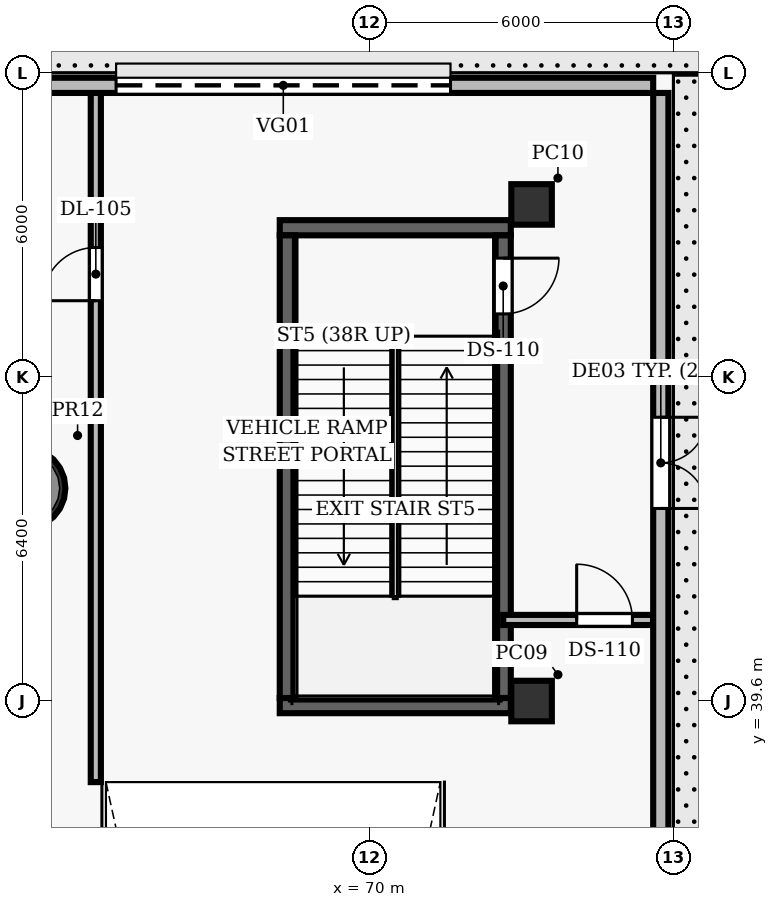
"""IFC4 building model, lengths in metres.
Left out: names, types, materials, properties, quantities, classifications, styles, units other than length and angle.
Written with IfcOpenShell. Run it as: python <this file> out.ifc"""

import sys

from ifc_helpers import new_model, si_unit, direction, frame, frame_2d, origin, origin_2d, place, context, subcontext, project, spatial, rectangle, hollow_circle, extrude, element, fill, save


model = new_model("IFC4")
c1 = context("Model", 3, precision=1e-05, world=origin(), true_north=direction((0.0, 1.0)))
c2 = subcontext(c1, "Body", "Model", "MODEL_VIEW")
j1 = project(units=[si_unit("LENGTHUNIT", "METRE"), si_unit("PLANEANGLEUNIT", "RADIAN")], contexts=[c1])
p1 = place(None, origin())
s1 = spatial("IfcSite", under=j1, at=p1, CompositionType="ELEMENT")
p2 = place(p1, origin())
s2 = spatial("IfcBuilding", under=s1, at=p2, CompositionType="ELEMENT")
p3 = place(p2, origin())
s3 = spatial("IfcBuildingStorey", under=s2, at=p3, CompositionType="ELEMENT", Elevation=0.0)
for number, where, z_axis, x_axis in (
    (1, (73.2, 39.6, 0.0), (0.0, 0.0, 1.0), (1.0, 0.0, 0.0)),
    (2, (73.2, 49.4, 0.0), (0.0, 0.0, 1.0), (1.0, 0.0, 0.0)),
):
    element("IfcColumn", number, at=place(p3, frame(where, z_axis=z_axis, x_axis=x_axis)), inside=s3, PredefinedType="COLUMN", context=c2, shape_type="SweptSolid", body=[
        extrude(rectangle(XDim=0.8, YDim=0.8, at=origin_2d()), origin(), (0.0, 0.0, 1.0), 6.6),
    ])
p4 = place(p3, frame((63.2, 43.8, 0.0), z_axis=(0.0, 0.0, 1.0), x_axis=(1.0, 0.0, 0.0)))
e3 = element("IfcColumn", 3, at=p4, inside=s3, PredefinedType="COLUMN", context=c2, shape_type="SweptSolid", body=[
    extrude(hollow_circle(Radius=0.8, WallThickness=0.06, at=origin_2d()), origin(), (0.0, 0.0, 1.0), 6.6),
])
for number, where, z_axis, x_axis in (
    (4, (68.23, 39.51, 0.0), (0.0, 0.0, 1.0), (1.0, 0.0, 0.0)),
    (5, (68.23, 48.94, 0.0), (0.0, 0.0, 1.0), (1.0, 0.0, 0.0)),
):
    element("IfcWall", number, at=place(p3, frame(where, z_axis=z_axis, x_axis=x_axis)), inside=s3, PredefinedType="SHEAR", context=c2, shape_type="SweptSolid", body=[
        extrude(rectangle(XDim=4.56, YDim=0.3, at=frame_2d((2.28, 0.0))), origin(), (0.0, 0.0, 1.0), 6.6),
    ])
p5 = place(p3, frame((68.38, 39.66, 0.0), z_axis=(0.0, 0.0, 1.0), x_axis=(0.0, 1.0, 0.0)))
e6 = element("IfcWall", 6, at=p5, inside=s3, PredefinedType="SHEAR", context=c2, shape_type="SweptSolid", body=[
    extrude(rectangle(XDim=9.13, YDim=0.3, at=frame_2d((4.565, 0.0))), origin(), (0.0, 0.0, 1.0), 6.6),
])
p6 = place(p3, frame((72.64, 48.79, 0.0), z_axis=(0.0, 0.0, 1.0), x_axis=(0.0, -1.0, 0.0)))
e7 = element("IfcWall", 7, at=p6, inside=s3, PredefinedType="SHEAR", context=c2, shape_type="SweptSolid", body=[
    extrude(rectangle(XDim=9.13, YDim=0.3, at=frame_2d((4.565, 0.0))), origin(), (0.0, 0.0, 1.0), 6.6),
])
p7 = place(p6, frame((0.45, 0.0, 0.0)))
e8 = element("IfcOpeningElement", 8, at=p7, cuts=e7, PredefinedType="OPENING", context=c2, shape_type="SweptSolid", body=[
    extrude(rectangle(XDim=1.1, YDim=2.15, at=frame_2d((0.55, 1.075))), frame((0.0, 0.16, 0.0), z_axis=(0.0, -1.0, 0.0), x_axis=(1.0, 0.0, 0.0)), (0.0, 0.0, 1.0), 0.32),
])
p8 = place(p3, frame((72.64, 41.2, 0.0), z_axis=(0.0, 0.0, 1.0), x_axis=(1.0, 0.0, 0.0)))
e9 = element("IfcWall", 9, at=p8, inside=s3, PredefinedType="PARTITIONING", context=c2, shape_type="SweptSolid", body=[
    extrude(rectangle(XDim=2.96, YDim=0.2, at=frame_2d((1.48, 0.0))), origin(), (0.0, 0.0, 1.0), 5.31),
])
p9 = place(p8, frame((1.45, 0.0, 0.0)))
e10 = element("IfcOpeningElement", 10, at=p9, cuts=e9, PredefinedType="OPENING", context=c2, shape_type="SweptSolid", body=[
    extrude(rectangle(XDim=1.1, YDim=2.15, at=frame_2d((0.55, 1.075))), frame((0.0, 0.11, 0.0), z_axis=(0.0, -1.0, 0.0), x_axis=(1.0, 0.0, 0.0)), (0.0, 0.0, 1.0), 0.22),
])
p10 = place(p3, frame((64.6, 38.0, 0.0), z_axis=(0.0, 0.0, 1.0), x_axis=(0.0, 1.0, 0.0)))
e11 = element("IfcWall", 11, at=p10, inside=s3, PredefinedType="PARTITIONING", context=c2, shape_type="SweptSolid", body=[
    extrude(rectangle(XDim=13.86, YDim=0.2, at=frame_2d((6.93, 0.0))), origin(), (0.0, 0.0, 1.0), 5.31),
])
p11 = place(p10, frame((9.5, 0.0, 0.0)))
e12 = element("IfcOpeningElement", 12, at=p11, cuts=e11, PredefinedType="OPENING", context=c2, shape_type="SweptSolid", body=[
    extrude(rectangle(XDim=1.05, YDim=2.15, at=frame_2d((0.525, 1.075))), frame((0.0, 0.11, 0.0), z_axis=(0.0, -1.0, 0.0), x_axis=(1.0, 0.0, 0.0)), (0.0, 0.0, 1.0), 0.22),
])
p12 = place(p3, frame((0.4, 51.75, 0.0), z_axis=(0.0, 0.0, 1.0), x_axis=(1.0, 0.0, 0.0)))
e13 = element("IfcWall", 13, at=p12, inside=s3, PredefinedType="SOLIDWALL", context=c2, shape_type="SweptSolid", body=[
    extrude(rectangle(XDim=75.2, YDim=0.3, at=frame_2d((37.6, 0.0))), origin(), (0.0, 0.0, 1.0), 5.76),
])
p13 = place(p12, frame((22.0, 0.0, 1.0)))
e14 = element("IfcOpeningElement", 14, at=p13, cuts=e13, PredefinedType="OPENING", context=c2, shape_type="SweptSolid", body=[
    extrude(rectangle(XDim=2.4, YDim=2.0, at=frame_2d((1.2, 1.0))), frame((0.0, 0.16, 0.0), z_axis=(0.0, -1.0, 0.0), x_axis=(1.0, 0.0, 0.0)), (0.0, 0.0, 1.0), 0.32),
])
p14 = place(p12, frame((42.0, 0.0, 1.0)))
e15 = element("IfcOpeningElement", 15, at=p14, cuts=e13, PredefinedType="OPENING", context=c2, shape_type="SweptSolid", body=[
    extrude(rectangle(XDim=2.4, YDim=2.0, at=frame_2d((1.2, 1.0))), frame((0.0, 0.16, 0.0), z_axis=(0.0, -1.0, 0.0), x_axis=(1.0, 0.0, 0.0)), (0.0, 0.0, 1.0), 0.32),
])
p15 = place(p12, frame((11.6, 0.0, 0.0)))
e16 = element("IfcOpeningElement", 16, at=p15, cuts=e13, PredefinedType="OPENING", context=c2, shape_type="SweptSolid", body=[
    extrude(rectangle(XDim=1.8, YDim=2.3, at=frame_2d((0.9, 1.15))), frame((0.0, 0.16, 0.0), z_axis=(0.0, -1.0, 0.0), x_axis=(1.0, 0.0, 0.0)), (0.0, 0.0, 1.0), 0.32),
])
p16 = place(p12, frame((16.6, 0.0, 0.0)))
e17 = element("IfcOpeningElement", 17, at=p16, cuts=e13, PredefinedType="OPENING", context=c2, shape_type="SweptSolid", body=[
    extrude(rectangle(XDim=1.8, YDim=2.3, at=frame_2d((0.9, 1.15))), frame((0.0, 0.16, 0.0), z_axis=(0.0, -1.0, 0.0), x_axis=(1.0, 0.0, 0.0)), (0.0, 0.0, 1.0), 0.32),
])
p17 = place(p12, frame((30.7, 0.0, 0.0)))
e18 = element("IfcOpeningElement", 18, at=p17, cuts=e13, PredefinedType="OPENING", context=c2, shape_type="SweptSolid", body=[
    extrude(rectangle(XDim=1.8, YDim=2.3, at=frame_2d((0.9, 1.15))), frame((0.0, 0.16, 0.0), z_axis=(0.0, -1.0, 0.0), x_axis=(1.0, 0.0, 0.0)), (0.0, 0.0, 1.0), 0.32),
])
p18 = place(p12, frame((34.8, 0.0, 0.0)))
e19 = element("IfcOpeningElement", 19, at=p18, cuts=e13, PredefinedType="OPENING", context=c2, shape_type="SweptSolid", body=[
    extrude(rectangle(XDim=1.8, YDim=2.3, at=frame_2d((0.9, 1.15))), frame((0.0, 0.16, 0.0), z_axis=(0.0, -1.0, 0.0), x_axis=(1.0, 0.0, 0.0)), (0.0, 0.0, 1.0), 0.32),
])
p19 = place(p12, frame((52.2, 0.0, 0.0)))
e20 = element("IfcOpeningElement", 20, at=p19, cuts=e13, PredefinedType="OPENING", context=c2, shape_type="SweptSolid", body=[
    extrude(rectangle(XDim=1.8, YDim=2.3, at=frame_2d((0.9, 1.15))), frame((0.0, 0.16, 0.0), z_axis=(0.0, -1.0, 0.0), x_axis=(1.0, 0.0, 0.0)), (0.0, 0.0, 1.0), 0.32),
])
p20 = place(p12, frame((64.6, 0.0, 0.0)))
e21 = element("IfcOpeningElement", 21, at=p20, cuts=e13, PredefinedType="OPENING", context=c2, shape_type="SweptSolid", body=[
    extrude(rectangle(XDim=6.6, YDim=3.2, at=frame_2d((3.3, 1.6))), frame((0.0, 0.16, 0.0), z_axis=(0.0, -1.0, 0.0), x_axis=(1.0, 0.0, 0.0)), (0.0, 0.0, 1.0), 0.32),
])
p21 = place(p3, frame((75.75, 51.6, 0.0), z_axis=(0.0, 0.0, 1.0), x_axis=(0.0, -1.0, 0.0)))
e22 = element("IfcWall", 22, at=p21, inside=s3, PredefinedType="SOLIDWALL", context=c2, shape_type="SweptSolid", body=[
    extrude(rectangle(XDim=51.2, YDim=0.3, at=frame_2d((25.6, 0.0))), origin(), (0.0, 0.0, 1.0), 5.76),
])
p22 = place(p21, frame((46.2, 0.0, 0.0)))
e23 = element("IfcOpeningElement", 23, at=p22, cuts=e22, PredefinedType="OPENING", context=c2, shape_type="SweptSolid", body=[
    extrude(rectangle(XDim=1.8, YDim=2.3, at=frame_2d((0.9, 1.15))), frame((0.0, 0.16, 0.0), z_axis=(0.0, -1.0, 0.0), x_axis=(1.0, 0.0, 0.0)), (0.0, 0.0, 1.0), 0.32),
])
p23 = place(p21, frame((6.4, 0.0, 0.0)))
e24 = element("IfcOpeningElement", 24, at=p23, cuts=e22, PredefinedType="OPENING", context=c2, shape_type="SweptSolid", body=[
    extrude(rectangle(XDim=1.8, YDim=2.3, at=frame_2d((0.9, 1.15))), frame((0.0, 0.16, 0.0), z_axis=(0.0, -1.0, 0.0), x_axis=(1.0, 0.0, 0.0)), (0.0, 0.0, 1.0), 0.32),
])
p24 = place(p7, origin())
e25 = element("IfcDoor", 25, at=p24, inside=s3, OperationType="SINGLE_SWING_LEFT", PredefinedType="DOOR", context=c2, shape_type="SweptSolid", body=[
    extrude(rectangle(XDim=1.1, YDim=2.15, at=frame_2d((0.55, 1.075))), frame((0.0, 0.025, 0.0), z_axis=(0.0, -1.0, 0.0), x_axis=(1.0, 0.0, 0.0)), (0.0, 0.0, 1.0), 0.05),
])
fill(e8, e25)
p25 = place(p9, origin())
e26 = element("IfcDoor", 26, at=p25, inside=s3, OperationType="SINGLE_SWING_LEFT", PredefinedType="DOOR", context=c2, shape_type="SweptSolid", body=[
    extrude(rectangle(XDim=1.1, YDim=2.15, at=frame_2d((0.55, 1.075))), frame((0.0, 0.025, 0.0), z_axis=(0.0, -1.0, 0.0), x_axis=(1.0, 0.0, 0.0)), (0.0, 0.0, 1.0), 0.05),
])
fill(e10, e26)
p26 = place(p11, origin())
e27 = element("IfcDoor", 27, at=p26, inside=s3, OperationType="SINGLE_SWING_LEFT", PredefinedType="DOOR", context=c2, shape_type="SweptSolid", body=[
    extrude(rectangle(XDim=1.05, YDim=2.15, at=frame_2d((0.525, 1.075))), frame((0.0, 0.025, 0.0), z_axis=(0.0, -1.0, 0.0), x_axis=(1.0, 0.0, 0.0)), (0.0, 0.0, 1.0), 0.05),
])
fill(e12, e27)
p27 = place(p20, origin())
e28 = element("IfcDoor", 28, at=p27, inside=s3, OperationType="ROLLINGUP", PredefinedType="GATE", context=c2, shape_type="SweptSolid", body=[
    extrude(rectangle(XDim=6.6, YDim=3.2, at=frame_2d((3.3, 1.6))), frame((0.0, 0.025, 0.0), z_axis=(0.0, -1.0, 0.0), x_axis=(1.0, 0.0, 0.0)), (0.0, 0.0, 1.0), 0.05),
])
fill(e21, e28)
p28 = place(p23, origin())
e29 = element("IfcDoor", 29, at=p28, inside=s3, OperationType="DOUBLE_DOOR_SINGLE_SWING", PredefinedType="DOOR", context=c2, shape_type="SweptSolid", body=[
    extrude(rectangle(XDim=1.8, YDim=2.3, at=frame_2d((0.9, 1.15))), frame((0.0, 0.025, 0.0), z_axis=(0.0, -1.0, 0.0), x_axis=(1.0, 0.0, 0.0)), (0.0, 0.0, 1.0), 0.05),
])
fill(e24, e29)
save(model, sys.argv[1])
